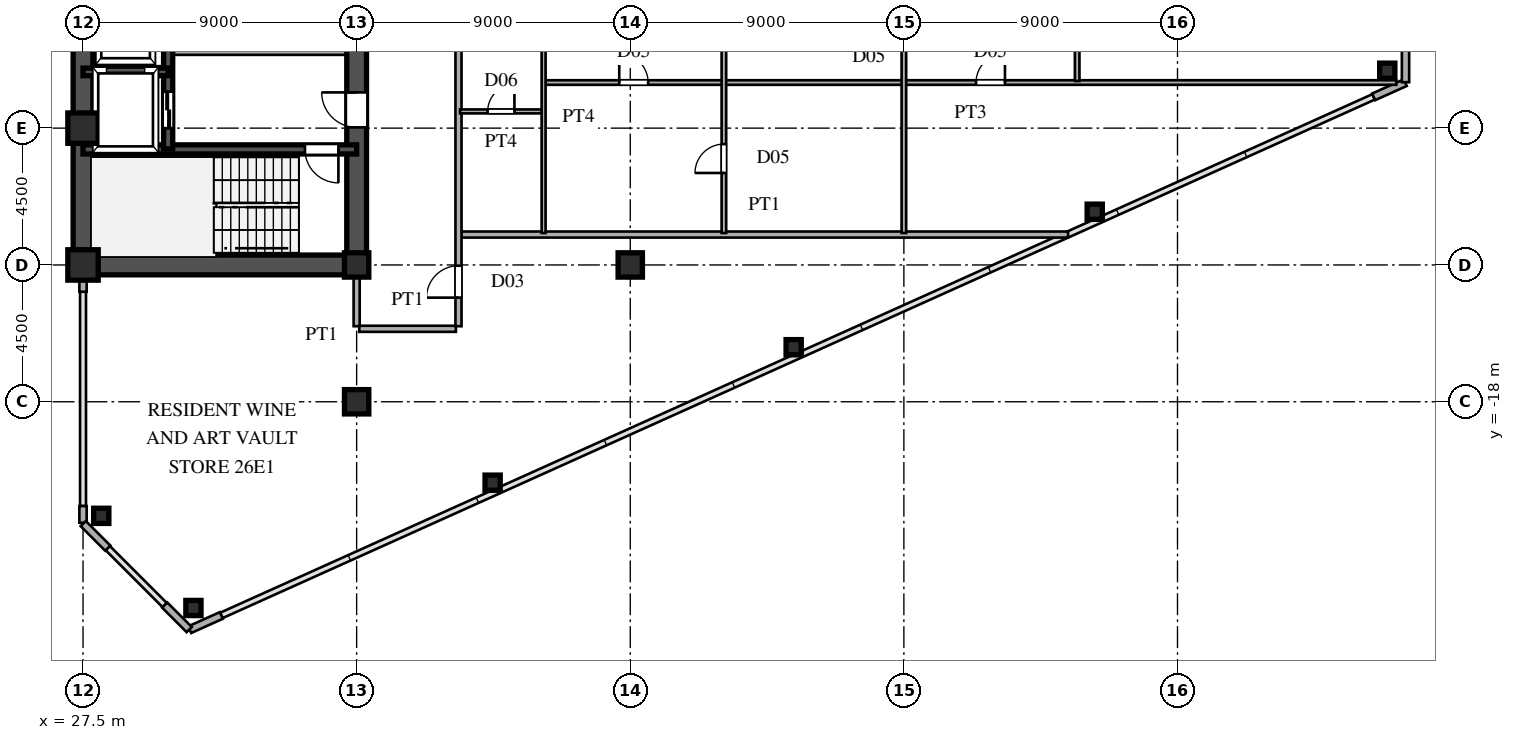
"""IFC4 building model, lengths in metres.
Left out: names, types, materials, properties, quantities, classifications, styles, units other than length and angle.
Written with IfcOpenShell. Run it as: python <this file> out.ifc"""

import sys

from ifc_helpers import new_model, si_unit, direction, frame, frame_2d, origin, origin_2d, place, context, subcontext, project, spatial, rectangle, hollow_rectangle, i_section, extrude, source, transform, mapped, element, fill, save


model = new_model("IFC4")
c1 = context("Model", 3, precision=1e-05, world=origin(), true_north=direction((0.0, 1.0)))
c2 = subcontext(c1, "Body", "Model", "MODEL_VIEW")
j1 = project(units=[si_unit("LENGTHUNIT", "METRE"), si_unit("PLANEANGLEUNIT", "RADIAN")], contexts=[c1])
p1 = place(None, origin())
s1 = spatial("IfcSite", under=j1, at=p1, CompositionType="ELEMENT")
p2 = place(p1, origin())
s2 = spatial("IfcBuilding", under=s1, at=p2, CompositionType="ELEMENT")
p3 = place(p2, frame((0.0, 0.0, 99.6)))
s3 = spatial("IfcBuildingStorey", under=s2, at=p3, CompositionType="ELEMENT", Elevation=99.6)
m1 = source(origin(), c2, "Body", "SweptSolid", [
    extrude(hollow_rectangle(XDim=1.0, YDim=1.0, WallThickness=0.042, at=origin_2d()), origin(), (0.0, 0.0, 1.0), 3.6),
])
for number, where, z_axis, x_axis in (
    (1, (27.5, -13.5, 0.0), (0.0, 0.0, 1.0), (1.0, 0.0, 0.0)),
    (2, (27.5, -9.0, 0.0), (0.0, 0.0, 1.0), (1.0, 0.0, 0.0)),
):
    element("IfcColumn", number, at=place(p3, frame(where, z_axis=z_axis, x_axis=x_axis)), inside=s3, PredefinedType="COLUMN", context=c2, shape_type="MappedRepresentation", body=[
        mapped(m1, transform((0.0, 0.0, 0.0), scale=1.0)),
    ])
m2 = source(origin(), c2, "Body", "SweptSolid", [
    extrude(i_section(OverallWidth=0.8, OverallDepth=0.8, WebThickness=0.032, FlangeThickness=0.05, at=origin_2d()), origin(), (0.0, 0.0, 1.0), 3.6),
])
for number, where, z_axis, x_axis in (
    (3, (36.5, -18.0, 0.0), (0.0, 0.0, 1.0), (1.0, 0.0, 0.0)),
    (4, (36.5, -13.5, 0.0), (0.0, 0.0, 1.0), (1.0, 0.0, 0.0)),
    (5, (45.5, -13.5, 0.0), (0.0, 0.0, 1.0), (1.0, 0.0, 0.0)),
):
    element("IfcColumn", number, at=place(p3, frame(where, z_axis=z_axis, x_axis=x_axis)), inside=s3, PredefinedType="COLUMN", context=c2, shape_type="MappedRepresentation", body=[
        mapped(m2, transform((0.0, 0.0, 0.0), scale=1.0)),
    ])
m3 = source(origin(), c2, "Body", "SweptSolid", [
    extrude(hollow_rectangle(XDim=0.5, YDim=0.5, WallThickness=0.02, at=origin_2d()), origin(), (0.0, 0.0, 1.0), 3.6),
])
for number, where, z_axis, x_axis in (
    (6, (31.131, -24.783, 0.0), (0.0, 0.0, 1.0), (1.0, 0.0, 0.0)),
    (7, (70.4, -7.112, 0.0), (0.0, 0.0, 1.0), (1.0, 0.0, 0.0)),
    (8, (28.1, -21.751, 0.0), (0.0, 0.0, 1.0), (1.0, 0.0, 0.0)),
    (9, (40.973, -20.661, 0.0), (0.0, 0.0, 1.0), (1.0, 0.0, 0.0)),
    (10, (50.875, -16.205, 0.0), (0.0, 0.0, 1.0), (1.0, 0.0, 0.0)),
    (11, (60.778, -11.749, 0.0), (0.0, 0.0, 1.0), (1.0, 0.0, 0.0)),
):
    element("IfcColumn", number, at=place(p3, frame(where, z_axis=z_axis, x_axis=x_axis)), inside=s3, PredefinedType="COLUMN", context=c2, shape_type="MappedRepresentation", body=[
        mapped(m3, transform((0.0, 0.0, 0.0), scale=1.0)),
    ])
for number, where, z_axis, x_axis in (
    (12, (31.009, -25.496, 0.0), (0.0, 0.0, 1.0), (0.912, 0.41, 0.0)),
    (13, (69.951, -7.972, 0.0), (0.0, 0.0, 1.0), (0.912, 0.41, 0.0)),
    (14, (71.0, -7.49, 0.0), (0.0, 0.0, 1.0), (0.0, 1.0, 0.0)),
):
    element("IfcWall", number, at=place(p3, frame(where, z_axis=z_axis, x_axis=x_axis)), inside=s3, PredefinedType="SOLIDWALL", context=c2, shape_type="SweptSolid", body=[
        extrude(rectangle(XDim=1.14, YDim=0.24, at=frame_2d((0.57, 0.0))), origin(), (0.0, 0.0, 1.0), 3.38),
    ])
p4 = place(p3, frame((27.5, -21.98, 0.0), z_axis=(0.0, 0.0, 1.0), x_axis=(0.0, 1.0, 0.0)))
e15 = element("IfcWall", 15, at=p4, inside=s3, PredefinedType="SOLIDWALL", context=c2, shape_type="SweptSolid", body=[
    extrude(rectangle(XDim=0.55, YDim=0.24, at=frame_2d((0.275, 0.0))), origin(), (0.0, 0.0, 1.0), 3.38),
])
p5 = place(p3, frame((27.5, -14.38, 0.0), z_axis=(0.0, 0.0, 1.0), x_axis=(0.0, 1.0, 0.0)))
e16 = element("IfcWall", 16, at=p5, inside=s3, PredefinedType="SOLIDWALL", context=c2, shape_type="SweptSolid", body=[
    extrude(rectangle(XDim=0.55, YDim=0.24, at=frame_2d((0.275, 0.0))), origin(), (0.0, 0.0, 1.0), 2.88),
])
for number, where, z_axis, x_axis in (
    (17, (27.507, -22.007, 0.0), (0.0, 0.0, 1.0), (0.707, -0.707, 0.0)),
    (18, (30.187, -24.687, 0.0), (0.0, 0.0, 1.0), (0.707, -0.707, 0.0)),
):
    element("IfcWall", number, at=place(p3, frame(where, z_axis=z_axis, x_axis=x_axis)), inside=s3, PredefinedType="SOLIDWALL", context=c2, shape_type="SweptSolid", body=[
        extrude(rectangle(XDim=1.14, YDim=0.24, at=frame_2d((0.57, 0.0))), origin(), (0.0, 0.0, 1.0), 3.38),
    ])
p6 = place(p3, frame((27.5, -13.5, 0.0), z_axis=(0.0, 0.0, 1.0), x_axis=(0.0, 1.0, 0.0)))
e19 = element("IfcWall", 19, at=p6, inside=s3, PredefinedType="SHEAR", context=c2, shape_type="SweptSolid", body=[
    extrude(rectangle(XDim=12.2, YDim=0.65, at=frame_2d((6.1, 0.0))), origin(), (0.0, 0.0, 1.0), 3.38),
])
p7 = place(p3, frame((27.5, -13.5, 0.0), z_axis=(0.0, 0.0, 1.0), x_axis=(1.0, 0.0, 0.0)))
e20 = element("IfcWall", 20, at=p7, inside=s3, PredefinedType="SHEAR", context=c2, shape_type="SweptSolid", body=[
    extrude(rectangle(XDim=9.0, YDim=0.65, at=frame_2d((4.5, 0.0))), origin(), (0.0, 0.0, 1.0), 3.38),
])
p8 = place(p3, frame((36.5, -13.65, 0.0), z_axis=(0.0, 0.0, 1.0), x_axis=(0.0, 1.0, 0.0)))
e21 = element("IfcWall", 21, at=p8, inside=s3, PredefinedType="SHEAR", context=c2, shape_type="SweptSolid", body=[
    extrude(rectangle(XDim=7.15, YDim=0.65, at=frame_2d((3.575, 0.0))), origin(), (0.0, 0.0, 1.0), 3.38),
])
p9 = place(p8, frame((4.675, 0.0, 0.0)))
e22 = element("IfcOpeningElement", 22, at=p9, cuts=e21, PredefinedType="OPENING", context=c2, shape_type="SweptSolid", body=[
    extrude(rectangle(XDim=1.15, YDim=2.2, at=frame_2d((0.575, 1.1))), frame((0.0, 0.335, 0.0), z_axis=(0.0, -1.0, 0.0), x_axis=(1.0, 0.0, 0.0)), (0.0, 0.0, 1.0), 0.67),
])
p10 = place(p3, frame((27.5, -9.7, 0.0), z_axis=(0.0, 0.0, 1.0), x_axis=(1.0, 0.0, 0.0)))
e23 = element("IfcWall", 23, at=p10, inside=s3, PredefinedType="SHEAR", context=c2, shape_type="SweptSolid", body=[
    extrude(rectangle(XDim=9.0, YDim=0.3, at=frame_2d((4.5, 0.0))), origin(), (0.0, 0.0, 1.0), 3.38),
])
p11 = place(p10, frame((7.3, 0.0, 0.0)))
e24 = element("IfcOpeningElement", 24, at=p11, cuts=e23, PredefinedType="OPENING", context=c2, shape_type="SweptSolid", body=[
    extrude(rectangle(XDim=1.1, YDim=2.2, at=frame_2d((0.55, 1.1))), frame((0.0, 0.16, 0.0), z_axis=(0.0, -1.0, 0.0), x_axis=(1.0, 0.0, 0.0)), (0.0, 0.0, 1.0), 0.32),
])
p12 = place(p3, frame((27.5, -7.15, 0.0), z_axis=(0.0, 0.0, 1.0), x_axis=(1.0, 0.0, 0.0)))
e25 = element("IfcWall", 25, at=p12, inside=s3, PredefinedType="SHEAR", context=c2, shape_type="SweptSolid", body=[
    extrude(rectangle(XDim=2.8, YDim=0.25, at=frame_2d((1.4, 0.0))), origin(), (0.0, 0.0, 1.0), 3.38),
])
p13 = place(p3, frame((30.3, -9.68, 0.0), z_axis=(0.0, 0.0, 1.0), x_axis=(0.0, 1.0, 0.0)))
e26 = element("IfcWall", 26, at=p13, inside=s3, PredefinedType="SHEAR", context=c2, shape_type="SweptSolid", body=[
    extrude(rectangle(XDim=2.56, YDim=0.3, at=frame_2d((1.28, 0.0))), origin(), (0.0, 0.0, 1.0), 3.38),
])
p14 = place(p13, frame((0.68, 0.0, 0.0)))
e27 = element("IfcOpeningElement", 27, at=p14, cuts=e26, PredefinedType="OPENING", context=c2, shape_type="SweptSolid", body=[
    extrude(rectangle(XDim=1.2, YDim=2.25, at=frame_2d((0.6, 1.125))), frame((0.0, 0.16, 0.0), z_axis=(0.0, -1.0, 0.0), x_axis=(1.0, 0.0, 0.0)), (0.0, 0.0, 1.0), 0.32),
])
p15 = place(p3, frame((30.3, -7.12, 0.0), z_axis=(0.0, 0.0, 1.0), x_axis=(0.0, 1.0, 0.0)))
e28 = element("IfcWall", 28, at=p15, inside=s3, PredefinedType="SHEAR", context=c2, shape_type="SweptSolid", body=[
    extrude(rectangle(XDim=2.92, YDim=0.3, at=frame_2d((1.46, 0.0))), origin(), (0.0, 0.0, 1.0), 3.38),
])
p16 = place(p15, frame((0.91, 0.0, 0.0)))
e29 = element("IfcOpeningElement", 29, at=p16, cuts=e28, PredefinedType="OPENING", context=c2, shape_type="SweptSolid", body=[
    extrude(rectangle(XDim=1.1, YDim=2.2, at=frame_2d((0.55, 1.1))), frame((0.0, 0.16, 0.0), z_axis=(0.0, -1.0, 0.0), x_axis=(1.0, 0.0, 0.0)), (0.0, 0.0, 1.0), 0.32),
])
p17 = place(p3, frame((30.45, -6.5, 0.0), z_axis=(0.0, 0.0, 1.0), x_axis=(1.0, 0.0, 0.0)))
e30 = element("IfcWall", 30, at=p17, inside=s3, PredefinedType="PARTITIONING", context=c2, shape_type="SweptSolid", body=[
    extrude(rectangle(XDim=5.7, YDim=0.18, at=frame_2d((2.85, 0.0))), origin(), (0.0, 0.0, 1.0), 3.38),
])
p18 = place(p3, frame((36.585, -15.6, 0.0), z_axis=(0.0, 0.0, 1.0), x_axis=(1.0, 0.0, 0.0)))
e31 = element("IfcWall", 31, at=p18, inside=s3, PredefinedType="PARTITIONING", context=c2, shape_type="SweptSolid", body=[
    extrude(rectangle(XDim=3.18, YDim=0.2, at=frame_2d((1.59, 0.0))), origin(), (0.0, 0.0, 1.0), 3.38),
])
p19 = place(p3, frame((39.93, -12.5, 0.0), z_axis=(0.0, 0.0, 1.0), x_axis=(1.0, 0.0, 0.0)))
e32 = element("IfcWall", 32, at=p19, inside=s3, PredefinedType="PARTITIONING", context=c2, shape_type="SweptSolid", body=[
    extrude(rectangle(XDim=19.971, YDim=0.2, at=frame_2d((9.985, 0.0))), origin(), (0.0, 0.0, 1.0), 3.38),
])
p20 = place(p3, frame((39.9, -8.45, 0.0), z_axis=(0.0, 0.0, 1.0), x_axis=(1.0, 0.0, 0.0)))
e33 = element("IfcWall", 33, at=p20, inside=s3, PredefinedType="PARTITIONING", context=c2, shape_type="SweptSolid", body=[
    extrude(rectangle(XDim=2.7, YDim=0.13, at=frame_2d((1.35, 0.0))), origin(), (0.0, 0.0, 1.0), 3.38),
])
p21 = place(p20, frame((0.91, 0.0, 0.0)))
e34 = element("IfcOpeningElement", 34, at=p21, cuts=e33, PredefinedType="OPENING", context=c2, shape_type="SweptSolid", body=[
    extrude(rectangle(XDim=0.88, YDim=2.1, at=frame_2d((0.44, 1.05))), frame((0.0, 0.075, 0.0), z_axis=(0.0, -1.0, 0.0), x_axis=(1.0, 0.0, 0.0)), (0.0, 0.0, 1.0), 0.15),
])
p22 = place(p3, frame((42.7, -7.5, 0.0), z_axis=(0.0, 0.0, 1.0), x_axis=(1.0, 0.0, 0.0)))
e35 = element("IfcWall", 35, at=p22, inside=s3, PredefinedType="PARTITIONING", context=c2, shape_type="SweptSolid", body=[
    extrude(rectangle(XDim=27.995, YDim=0.15, at=frame_2d((13.998, 0.0))), origin(), (0.0, 0.0, 1.0), 3.38),
])
p23 = place(p22, frame((2.438, 0.0, 0.0)))
e36 = element("IfcOpeningElement", 36, at=p23, cuts=e35, PredefinedType="OPENING", context=c2, shape_type="SweptSolid", body=[
    extrude(rectangle(XDim=0.95, YDim=2.15, at=frame_2d((0.475, 1.075))), frame((0.0, 0.085, 0.0), z_axis=(0.0, -1.0, 0.0), x_axis=(1.0, 0.0, 0.0)), (0.0, 0.0, 1.0), 0.17),
])
p24 = place(p22, frame((14.175, 0.0, 0.0)))
e37 = element("IfcOpeningElement", 37, at=p24, cuts=e35, PredefinedType="OPENING", context=c2, shape_type="SweptSolid", body=[
    extrude(rectangle(XDim=0.95, YDim=2.15, at=frame_2d((0.475, 1.075))), frame((0.0, 0.085, 0.0), z_axis=(0.0, -1.0, 0.0), x_axis=(1.0, 0.0, 0.0)), (0.0, 0.0, 1.0), 0.17),
])
p25 = place(p3, frame((36.5, -15.515, 0.0), z_axis=(0.0, 0.0, 1.0), x_axis=(0.0, 1.0, 0.0)))
e38 = element("IfcWall", 38, at=p25, inside=s3, PredefinedType="PARTITIONING", context=c2, shape_type="SweptSolid", body=[
    extrude(rectangle(XDim=1.685, YDim=0.2, at=frame_2d((0.842, 0.0))), origin(), (0.0, 0.0, 1.0), 2.68),
])
p26 = place(p3, frame((39.85, -15.515, 0.0), z_axis=(0.0, 0.0, 1.0), x_axis=(0.0, 1.0, 0.0)))
e39 = element("IfcWall", 39, at=p26, inside=s3, PredefinedType="PARTITIONING", context=c2, shape_type="SweptSolid", body=[
    extrude(rectangle(XDim=31.03, YDim=0.2, at=frame_2d((15.515, 0.0))), origin(), (0.0, 0.0, 1.0), 3.38),
])
p27 = place(p26, frame((0.94, 0.0, 0.0)))
e40 = element("IfcOpeningElement", 40, at=p27, cuts=e39, PredefinedType="OPENING", context=c2, shape_type="SweptSolid", body=[
    extrude(rectangle(XDim=1.05, YDim=2.25, at=frame_2d((0.525, 1.125))), frame((0.0, 0.11, 0.0), z_axis=(0.0, -1.0, 0.0), x_axis=(1.0, 0.0, 0.0)), (0.0, 0.0, 1.0), 0.22),
])
p28 = place(p26, frame((9.765, 0.0, 0.0)))
e41 = element("IfcOpeningElement", 41, at=p28, cuts=e39, PredefinedType="OPENING", context=c2, shape_type="SweptSolid", body=[
    extrude(rectangle(XDim=1.05, YDim=2.25, at=frame_2d((0.525, 1.125))), frame((0.0, 0.11, 0.0), z_axis=(0.0, -1.0, 0.0), x_axis=(1.0, 0.0, 0.0)), (0.0, 0.0, 1.0), 0.22),
])
p29 = place(p26, frame((24.067, 0.0, 0.0)))
e42 = element("IfcOpeningElement", 42, at=p29, cuts=e39, PredefinedType="OPENING", context=c2, shape_type="SweptSolid", body=[
    extrude(rectangle(XDim=1.05, YDim=2.25, at=frame_2d((0.525, 1.125))), frame((0.0, 0.11, 0.0), z_axis=(0.0, -1.0, 0.0), x_axis=(1.0, 0.0, 0.0)), (0.0, 0.0, 1.0), 0.22),
])
p30 = place(p3, frame((42.65, -12.45, 0.0), z_axis=(0.0, 0.0, 1.0), x_axis=(0.0, 1.0, 0.0)))
e43 = element("IfcWall", 43, at=p30, inside=s3, PredefinedType="PARTITIONING", context=c2, shape_type="SweptSolid", body=[
    extrude(rectangle(XDim=9.9, YDim=0.13, at=frame_2d((4.95, 0.0))), origin(), (0.0, 0.0, 1.0), 3.38),
])
p31 = place(p30, frame((6.975, 0.0, 0.0)))
e44 = element("IfcOpeningElement", 44, at=p31, cuts=e43, PredefinedType="OPENING", context=c2, shape_type="SweptSolid", body=[
    extrude(rectangle(XDim=0.95, YDim=2.15, at=frame_2d((0.475, 1.075))), frame((0.0, 0.075, 0.0), z_axis=(0.0, -1.0, 0.0), x_axis=(1.0, 0.0, 0.0)), (0.0, 0.0, 1.0), 0.15),
])
p32 = place(p3, frame((48.58, -12.45, 0.0), z_axis=(0.0, 0.0, 1.0), x_axis=(0.0, 1.0, 0.0)))
e45 = element("IfcWall", 45, at=p32, inside=s3, PredefinedType="PARTITIONING", context=c2, shape_type="SweptSolid", body=[
    extrude(rectangle(XDim=26.738, YDim=0.15, at=frame_2d((13.369, 0.0))), origin(), (0.0, 0.0, 1.0), 3.38),
])
p33 = place(p32, frame((6.975, 0.0, 0.0)))
e46 = element("IfcOpeningElement", 46, at=p33, cuts=e45, PredefinedType="OPENING", context=c2, shape_type="SweptSolid", body=[
    extrude(rectangle(XDim=0.95, YDim=2.15, at=frame_2d((0.475, 1.075))), frame((0.0, 0.085, 0.0), z_axis=(0.0, -1.0, 0.0), x_axis=(1.0, 0.0, 0.0)), (0.0, 0.0, 1.0), 0.17),
])
p34 = place(p32, frame((1.975, 0.0, 0.0)))
e47 = element("IfcOpeningElement", 47, at=p34, cuts=e45, PredefinedType="OPENING", context=c2, shape_type="SweptSolid", body=[
    extrude(rectangle(XDim=0.95, YDim=2.15, at=frame_2d((0.475, 1.075))), frame((0.0, 0.085, 0.0), z_axis=(0.0, -1.0, 0.0), x_axis=(1.0, 0.0, 0.0)), (0.0, 0.0, 1.0), 0.17),
])
p35 = place(p32, frame((23.354, 0.0, 0.0)))
e48 = element("IfcOpeningElement", 48, at=p35, cuts=e45, PredefinedType="OPENING", context=c2, shape_type="SweptSolid", body=[
    extrude(rectangle(XDim=0.95, YDim=2.15, at=frame_2d((0.475, 1.075))), frame((0.0, 0.085, 0.0), z_axis=(0.0, -1.0, 0.0), x_axis=(1.0, 0.0, 0.0)), (0.0, 0.0, 1.0), 0.17),
])
p36 = place(p32, frame((17.435, 0.0, 0.0)))
e49 = element("IfcOpeningElement", 49, at=p36, cuts=e45, PredefinedType="OPENING", context=c2, shape_type="SweptSolid", body=[
    extrude(rectangle(XDim=0.95, YDim=2.15, at=frame_2d((0.475, 1.075))), frame((0.0, 0.085, 0.0), z_axis=(0.0, -1.0, 0.0), x_axis=(1.0, 0.0, 0.0)), (0.0, 0.0, 1.0), 0.17),
])
p37 = place(p3, frame((54.5, -12.45, 0.0), z_axis=(0.0, 0.0, 1.0), x_axis=(0.0, 1.0, 0.0)))
e50 = element("IfcWall", 50, at=p37, inside=s3, PredefinedType="PARTITIONING", context=c2, shape_type="SweptSolid", body=[
    extrude(rectangle(XDim=26.738, YDim=0.15, at=frame_2d((13.369, 0.0))), origin(), (0.0, 0.0, 1.0), 2.68),
])
p38 = place(p37, frame((6.458, 0.0, 0.0)))
e51 = element("IfcOpeningElement", 51, at=p38, cuts=e50, PredefinedType="OPENING", context=c2, shape_type="SweptSolid", body=[
    extrude(rectangle(XDim=0.95, YDim=2.15, at=frame_2d((0.475, 1.075))), frame((0.0, 0.085, 0.0), z_axis=(0.0, -1.0, 0.0), x_axis=(1.0, 0.0, 0.0)), (0.0, 0.0, 1.0), 0.17),
])
p39 = place(p37, frame((11.975, 0.0, 0.0)))
e52 = element("IfcOpeningElement", 52, at=p39, cuts=e50, PredefinedType="OPENING", context=c2, shape_type="SweptSolid", body=[
    extrude(rectangle(XDim=0.95, YDim=2.15, at=frame_2d((0.475, 1.075))), frame((0.0, 0.085, 0.0), z_axis=(0.0, -1.0, 0.0), x_axis=(1.0, 0.0, 0.0)), (0.0, 0.0, 1.0), 0.17),
])
p40 = place(p37, frame((23.354, 0.0, 0.0)))
e53 = element("IfcOpeningElement", 53, at=p40, cuts=e50, PredefinedType="OPENING", context=c2, shape_type="SweptSolid", body=[
    extrude(rectangle(XDim=0.95, YDim=2.15, at=frame_2d((0.475, 1.075))), frame((0.0, 0.085, 0.0), z_axis=(0.0, -1.0, 0.0), x_axis=(1.0, 0.0, 0.0)), (0.0, 0.0, 1.0), 0.17),
])
p41 = place(p37, frame((17.435, 0.0, 0.0)))
e54 = element("IfcOpeningElement", 54, at=p41, cuts=e50, PredefinedType="OPENING", context=c2, shape_type="SweptSolid", body=[
    extrude(rectangle(XDim=0.95, YDim=2.15, at=frame_2d((0.475, 1.075))), frame((0.0, 0.085, 0.0), z_axis=(0.0, -1.0, 0.0), x_axis=(1.0, 0.0, 0.0)), (0.0, 0.0, 1.0), 0.17),
])
p42 = place(p3, frame((60.2, -7.45, 0.0), z_axis=(0.0, 0.0, 1.0), x_axis=(0.0, 1.0, 0.0)))
e55 = element("IfcWall", 55, at=p42, inside=s3, PredefinedType="PARTITIONING", context=c2, shape_type="SweptSolid", body=[
    extrude(rectangle(XDim=15.819, YDim=0.15, at=frame_2d((7.909, 0.0))), origin(), (0.0, 0.0, 1.0), 3.38),
])
p43 = place(p42, frame((1.975, 0.0, 0.0)))
e56 = element("IfcOpeningElement", 56, at=p43, cuts=e55, PredefinedType="OPENING", context=c2, shape_type="SweptSolid", body=[
    extrude(rectangle(XDim=0.95, YDim=2.15, at=frame_2d((0.475, 1.075))), frame((0.0, 0.085, 0.0), z_axis=(0.0, -1.0, 0.0), x_axis=(1.0, 0.0, 0.0)), (0.0, 0.0, 1.0), 0.17),
])
p44 = place(p42, frame((6.975, 0.0, 0.0)))
e57 = element("IfcOpeningElement", 57, at=p44, cuts=e55, PredefinedType="OPENING", context=c2, shape_type="SweptSolid", body=[
    extrude(rectangle(XDim=0.95, YDim=2.15, at=frame_2d((0.475, 1.075))), frame((0.0, 0.085, 0.0), z_axis=(0.0, -1.0, 0.0), x_axis=(1.0, 0.0, 0.0)), (0.0, 0.0, 1.0), 0.17),
])
p45 = place(p42, frame((12.435, 0.0, 0.0)))
e58 = element("IfcOpeningElement", 58, at=p45, cuts=e55, PredefinedType="OPENING", context=c2, shape_type="SweptSolid", body=[
    extrude(rectangle(XDim=0.95, YDim=2.15, at=frame_2d((0.475, 1.075))), frame((0.0, 0.085, 0.0), z_axis=(0.0, -1.0, 0.0), x_axis=(1.0, 0.0, 0.0)), (0.0, 0.0, 1.0), 0.17),
])
m4 = source(origin(), c2, "Body", "SweptSolid", [
    extrude(rectangle(XDim=1.15, YDim=2.2, at=frame_2d((0.575, 1.1))), frame((0.0, 0.025, 0.0), z_axis=(0.0, -1.0, 0.0), x_axis=(1.0, 0.0, 0.0)), (0.0, 0.0, 1.0), 0.05),
])
p46 = place(p9, origin())
e59 = element("IfcDoor", 59, at=p46, inside=s3, OperationType="SINGLE_SWING_RIGHT", PredefinedType="DOOR", context=c2, shape_type="MappedRepresentation", body=[
    mapped(m4, transform((0.0, 0.0, 0.0), scale=1.0)),
])
fill(e22, e59)
m5 = source(origin(), c2, "Body", "SweptSolid", [
    extrude(rectangle(XDim=1.1, YDim=2.2, at=frame_2d((0.55, 1.1))), frame((0.0, 0.025, 0.0), z_axis=(0.0, -1.0, 0.0), x_axis=(1.0, 0.0, 0.0)), (0.0, 0.0, 1.0), 0.05),
])
p47 = place(p11, frame((1.1, 0.0, 0.0), z_axis=(0.0, 0.0, 1.0), x_axis=(-1.0, 0.0, 0.0)))
e60 = element("IfcDoor", 60, at=p47, inside=s3, OperationType="SINGLE_SWING_RIGHT", PredefinedType="DOOR", context=c2, shape_type="MappedRepresentation", body=[
    mapped(m5, transform((0.0, 0.0, 0.0), scale=1.0)),
])
fill(e24, e60)
m6 = source(origin(), c2, "Body", "SweptSolid", [
    extrude(rectangle(XDim=1.2, YDim=2.25, at=frame_2d((0.6, 1.125))), frame((0.0, 0.025, 0.0), z_axis=(0.0, -1.0, 0.0), x_axis=(1.0, 0.0, 0.0)), (0.0, 0.0, 1.0), 0.05),
])
p48 = place(p14, origin())
e61 = element("IfcDoor", 61, at=p48, inside=s3, OperationType="DOUBLE_DOOR_SLIDING", PredefinedType="DOOR", context=c2, shape_type="MappedRepresentation", body=[
    mapped(m6, transform((0.0, 0.0, 0.0), scale=1.0)),
])
fill(e27, e61)
m7 = source(origin(), c2, "Body", "SweptSolid", [
    extrude(rectangle(XDim=0.88, YDim=2.1, at=frame_2d((0.44, 1.05))), frame((0.0, 0.025, 0.0), z_axis=(0.0, -1.0, 0.0), x_axis=(1.0, 0.0, 0.0)), (0.0, 0.0, 1.0), 0.05),
])
p49 = place(p21, origin())
e62 = element("IfcDoor", 62, at=p49, inside=s3, OperationType="SINGLE_SWING_RIGHT", PredefinedType="DOOR", context=c2, shape_type="MappedRepresentation", body=[
    mapped(m7, transform((0.0, 0.0, 0.0), scale=1.0)),
])
fill(e34, e62)
m8 = source(origin(), c2, "Body", "SweptSolid", [
    extrude(rectangle(XDim=0.95, YDim=2.15, at=frame_2d((0.475, 1.075))), frame((0.0, 0.025, 0.0), z_axis=(0.0, -1.0, 0.0), x_axis=(1.0, 0.0, 0.0)), (0.0, 0.0, 1.0), 0.05),
])
p50 = place(p23, origin())
e63 = element("IfcDoor", 63, at=p50, inside=s3, OperationType="SINGLE_SWING_LEFT", PredefinedType="DOOR", context=c2, shape_type="MappedRepresentation", body=[
    mapped(m8, transform((0.0, 0.0, 0.0), scale=1.0)),
])
fill(e36, e63)
p51 = place(p24, origin())
e64 = element("IfcDoor", 64, at=p51, inside=s3, OperationType="SINGLE_SWING_RIGHT", PredefinedType="DOOR", context=c2, shape_type="MappedRepresentation", body=[
    mapped(m8, transform((0.0, 0.0, 0.0), scale=1.0)),
])
fill(e37, e64)
m9 = source(origin(), c2, "Body", "SweptSolid", [
    extrude(rectangle(XDim=1.05, YDim=2.25, at=frame_2d((0.525, 1.125))), frame((0.0, 0.025, 0.0), z_axis=(0.0, -1.0, 0.0), x_axis=(1.0, 0.0, 0.0)), (0.0, 0.0, 1.0), 0.05),
])
p52 = place(p27, origin())
e65 = element("IfcDoor", 65, at=p52, inside=s3, OperationType="SINGLE_SWING_LEFT", PredefinedType="DOOR", context=c2, shape_type="MappedRepresentation", body=[
    mapped(m9, transform((0.0, 0.0, 0.0), scale=1.0)),
])
fill(e40, e65)
p53 = place(p34, origin())
e66 = element("IfcDoor", 66, at=p53, inside=s3, OperationType="SINGLE_SWING_LEFT", PredefinedType="DOOR", context=c2, shape_type="MappedRepresentation", body=[
    mapped(m8, transform((0.0, 0.0, 0.0), scale=1.0)),
])
fill(e47, e66)
save(model, sys.argv[1])
